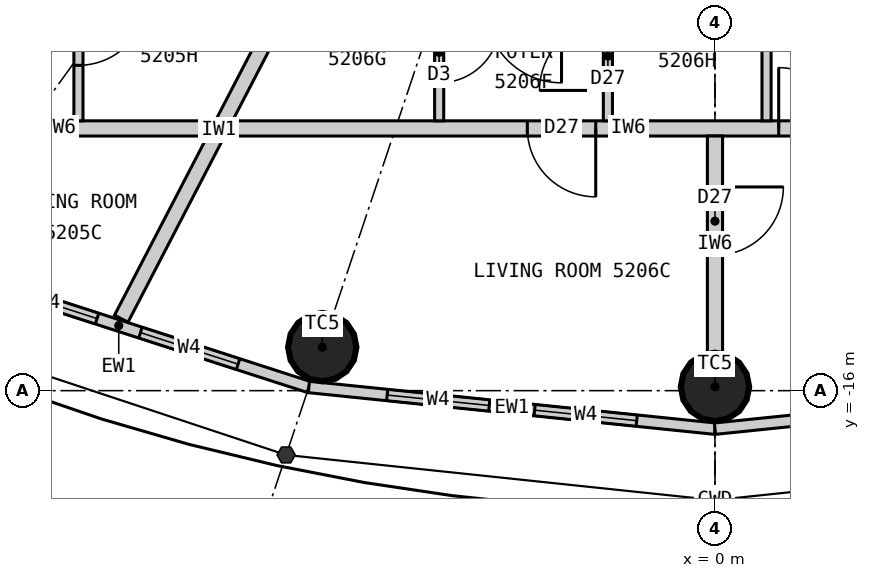
"""IFC4 building model, lengths in metres.
Left out: names, types, materials, properties, quantities, classifications, styles, units other than length and angle.
Written with IfcOpenShell. Run it as: python <this file> out.ifc"""

import sys

from ifc_helpers import new_model, si_unit, direction, frame, frame_2d, origin, origin_2d, place, context, subcontext, project, spatial, rectangle, circle, extrude, element, fill, save


model = new_model("IFC4")
c1 = context("Model", 3, precision=1e-05, world=origin(), true_north=direction((0.0, 1.0)))
c2 = subcontext(c1, "Body", "Model", "MODEL_VIEW")
j1 = project(units=[si_unit("LENGTHUNIT", "METRE"), si_unit("PLANEANGLEUNIT", "RADIAN")], contexts=[c1])
p1 = place(None, origin())
s1 = spatial("IfcSite", under=j1, at=p1, CompositionType="ELEMENT")
p2 = place(p1, origin())
s2 = spatial("IfcBuilding", under=s1, at=p2, CompositionType="ELEMENT")
p3 = place(p2, frame((0.0, 0.0, 196.2)))
s3 = spatial("IfcBuildingStorey", under=s2, at=p3, CompositionType="ELEMENT", Elevation=196.2)
for number, where, z_axis, x_axis in (
    (1, (-5.167, -15.427, 0.0), (0.0, 0.0, 1.0), (1.0, 0.0, 0.0)),
    (2, (0.0, -15.95, 0.0), (0.0, 0.0, 1.0), (1.0, 0.0, 0.0)),
):
    element("IfcColumn", number, at=place(p3, frame(where, z_axis=z_axis, x_axis=x_axis)), inside=s3, PredefinedType="COLUMN", context=c2, shape_type="SweptSolid", body=[
        extrude(circle(Radius=0.45, at=origin_2d()), origin(), (0.0, 0.0, 1.0), 3.3),
    ])
p4 = place(p3, frame((-10.346, -14.336, 0.0), z_axis=(0.0, 0.0, 1.0), x_axis=(0.951644702515, -0.307200846638, 0.0)))
e3 = element("IfcWall", 3, at=p4, inside=s3, PredefinedType="ELEMENTEDWALL", context=c2, shape_type="SweptSolid", body=[
    extrude(rectangle(XDim=5.258, YDim=0.15, at=frame_2d((2.629, 0.0))), origin(), (0.0, 0.0, 1.0), 3.12),
])
p5 = place(p4, frame((0.979, 0.0, 0.9)))
e4 = element("IfcOpeningElement", 4, at=p5, cuts=e3, PredefinedType="OPENING", context=c2, shape_type="SweptSolid", body=[
    extrude(rectangle(XDim=1.35, YDim=1.9, at=frame_2d((0.675, 0.95))), frame((0.0, 0.085, 0.0), z_axis=(0.0, -1.0, 0.0), x_axis=(1.0, 0.0, 0.0)), (0.0, 0.0, 1.0), 0.17),
])
p6 = place(p4, frame((2.929, 0.0, 0.9)))
e5 = element("IfcOpeningElement", 5, at=p6, cuts=e3, PredefinedType="OPENING", context=c2, shape_type="SweptSolid", body=[
    extrude(rectangle(XDim=1.35, YDim=1.9, at=frame_2d((0.675, 0.95))), frame((0.0, 0.085, 0.0), z_axis=(0.0, -1.0, 0.0), x_axis=(1.0, 0.0, 0.0)), (0.0, 0.0, 1.0), 0.17),
])
p7 = place(p3, frame((-5.343, -15.952, 0.0), z_axis=(0.0, 0.0, 1.0), x_axis=(0.994774574972, -0.102095763818, 0.0)))
e6 = element("IfcWall", 6, at=p7, inside=s3, PredefinedType="ELEMENTEDWALL", context=c2, shape_type="SweptSolid", body=[
    extrude(rectangle(XDim=5.371, YDim=0.15, at=frame_2d((2.686, 0.0))), origin(), (0.0, 0.0, 1.0), 3.12),
])
p8 = place(p7, frame((1.035, 0.0, 0.9)))
e7 = element("IfcOpeningElement", 7, at=p8, cuts=e6, PredefinedType="OPENING", context=c2, shape_type="SweptSolid", body=[
    extrude(rectangle(XDim=1.35, YDim=1.9, at=frame_2d((0.675, 0.95))), frame((0.0, 0.085, 0.0), z_axis=(0.0, -1.0, 0.0), x_axis=(1.0, 0.0, 0.0)), (0.0, 0.0, 1.0), 0.17),
])
p9 = place(p7, frame((2.985, 0.0, 0.9)))
e8 = element("IfcOpeningElement", 8, at=p9, cuts=e6, PredefinedType="OPENING", context=c2, shape_type="SweptSolid", body=[
    extrude(rectangle(XDim=1.35, YDim=1.9, at=frame_2d((0.675, 0.95))), frame((0.0, 0.085, 0.0), z_axis=(0.0, -1.0, 0.0), x_axis=(1.0, 0.0, 0.0)), (0.0, 0.0, 1.0), 0.17),
])
p10 = place(p3, frame((0.0, -16.5, 0.0), z_axis=(0.0, 0.0, 1.0), x_axis=(0.994774574972, 0.102095763818, 0.0)))
e9 = element("IfcWall", 9, at=p10, inside=s3, PredefinedType="ELEMENTEDWALL", context=c2, shape_type="SweptSolid", body=[
    extrude(rectangle(XDim=5.371, YDim=0.15, at=frame_2d((2.686, 0.0))), origin(), (0.0, 0.0, 1.0), 3.12),
])
p11 = place(p10, frame((1.035, 0.0, 0.9)))
e10 = element("IfcOpeningElement", 10, at=p11, cuts=e9, PredefinedType="OPENING", context=c2, shape_type="SweptSolid", body=[
    extrude(rectangle(XDim=1.35, YDim=1.9, at=frame_2d((0.675, 0.95))), frame((0.0, 0.085, 0.0), z_axis=(0.0, -1.0, 0.0), x_axis=(1.0, 0.0, 0.0)), (0.0, 0.0, 1.0), 0.17),
])
p12 = place(p10, frame((2.985, 0.0, 0.9)))
e11 = element("IfcOpeningElement", 11, at=p12, cuts=e9, PredefinedType="OPENING", context=c2, shape_type="SweptSolid", body=[
    extrude(rectangle(XDim=1.35, YDim=1.9, at=frame_2d((0.675, 0.95))), frame((0.0, 0.085, 0.0), z_axis=(0.0, -1.0, 0.0), x_axis=(1.0, 0.0, 0.0)), (0.0, 0.0, 1.0), 0.17),
])
p13 = place(p3, frame((-5.241, -10.1, 0.0), z_axis=(0.0, 0.0, 1.0), x_axis=(-0.460603196597, -0.887606160008, 0.0)))
e12 = element("IfcWall", 12, at=p13, inside=s3, PredefinedType="PARTITIONING", context=c2, shape_type="SweptSolid", body=[
    extrude(rectangle(XDim=5.58, YDim=0.2, at=frame_2d((2.79, 0.0))), origin(), (0.0, 0.0, 1.0), 3.12),
])
p14 = place(p3, frame((-10.609, -12.55, 0.0), z_axis=(0.0, 0.0, 1.0), x_axis=(1.0, 0.0, 0.0)))
e13 = element("IfcWall", 13, at=p14, inside=s3, PredefinedType="PARTITIONING", context=c2, shape_type="SweptSolid", body=[
    extrude(rectangle(XDim=3.947, YDim=0.2, at=frame_2d((1.974, 0.0))), origin(), (0.0, 0.0, 1.0), 3.12),
])
p15 = place(p3, frame((-8.375, -10.1, 0.0), z_axis=(0.0, 0.0, 1.0), x_axis=(0.0, -1.0, 0.0)))
e14 = element("IfcWall", 14, at=p15, inside=s3, PredefinedType="PARTITIONING", context=c2, shape_type="SweptSolid", body=[
    extrude(rectangle(XDim=2.35, YDim=0.12, at=frame_2d((1.175, 0.0))), origin(), (0.0, 0.0, 1.0), 3.12),
])
p16 = place(p15, frame((0.72, 0.0, 0.0)))
e15 = element("IfcOpeningElement", 15, at=p16, cuts=e14, PredefinedType="OPENING", context=c2, shape_type="SweptSolid", body=[
    extrude(rectangle(XDim=0.9, YDim=2.1, at=frame_2d((0.45, 1.05))), frame((0.0, 0.07, 0.0), z_axis=(0.0, -1.0, 0.0), x_axis=(1.0, 0.0, 0.0)), (0.0, 0.0, 1.0), 0.14),
])
p17 = place(p3, frame((-6.364, -12.55, 0.0), z_axis=(0.0, 0.0, 1.0), x_axis=(1.0, 0.0, 0.0)))
e16 = element("IfcWall", 16, at=p17, inside=s3, PredefinedType="PARTITIONING", context=c2, shape_type="SweptSolid", body=[
    extrude(rectangle(XDim=10.446, YDim=0.2, at=frame_2d((5.223, 0.0))), origin(), (0.0, 0.0, 1.0), 3.12),
])
p18 = place(p17, frame((7.202, 0.0, 0.0)))
e17 = element("IfcOpeningElement", 17, at=p18, cuts=e16, PredefinedType="OPENING", context=c2, shape_type="SweptSolid", body=[
    extrude(rectangle(XDim=0.8, YDim=2.1, at=frame_2d((0.4, 1.05))), frame((0.0, 0.11, 0.0), z_axis=(0.0, -1.0, 0.0), x_axis=(1.0, 0.0, 0.0)), (0.0, 0.0, 1.0), 0.22),
])
p19 = place(p17, frame((3.895, 0.0, 0.0)))
e18 = element("IfcOpeningElement", 18, at=p19, cuts=e16, PredefinedType="OPENING", context=c2, shape_type="SweptSolid", body=[
    extrude(rectangle(XDim=0.9, YDim=2.1, at=frame_2d((0.45, 1.05))), frame((0.0, 0.11, 0.0), z_axis=(0.0, -1.0, 0.0), x_axis=(1.0, 0.0, 0.0)), (0.0, 0.0, 1.0), 0.22),
])
p20 = place(p3, frame((0.0, -12.65, 0.0), z_axis=(0.0, 0.0, 1.0), x_axis=(0.0, -1.0, 0.0)))
e19 = element("IfcWall", 19, at=p20, inside=s3, PredefinedType="PARTITIONING", context=c2, shape_type="SweptSolid", body=[
    extrude(rectangle(XDim=2.85, YDim=0.2, at=frame_2d((1.425, 0.0))), origin(), (0.0, 0.0, 1.0), 2.42),
])
p21 = place(p20, frame((0.67, 0.0, 0.0)))
e20 = element("IfcOpeningElement", 20, at=p21, cuts=e19, PredefinedType="OPENING", context=c2, shape_type="SweptSolid", body=[
    extrude(rectangle(XDim=0.9, YDim=2.1, at=frame_2d((0.45, 1.05))), frame((0.0, 0.11, 0.0), z_axis=(0.0, -1.0, 0.0), x_axis=(1.0, 0.0, 0.0)), (0.0, 0.0, 1.0), 0.22),
])
p22 = place(p3, frame((-3.629, -10.1, 0.0), z_axis=(0.0, 0.0, 1.0), x_axis=(0.0, -1.0, 0.0)))
e21 = element("IfcWall", 21, at=p22, inside=s3, PredefinedType="PARTITIONING", context=c2, shape_type="SweptSolid", body=[
    extrude(rectangle(XDim=2.35, YDim=0.12, at=frame_2d((1.175, 0.0))), origin(), (0.0, 0.0, 1.0), 3.12),
])
p23 = place(p22, frame((1.05, 0.0, 0.0)))
e22 = element("IfcOpeningElement", 22, at=p23, cuts=e21, PredefinedType="OPENING", context=c2, shape_type="SweptSolid", body=[
    extrude(rectangle(XDim=0.8, YDim=2.1, at=frame_2d((0.4, 1.05))), frame((0.0, 0.07, 0.0), z_axis=(0.0, -1.0, 0.0), x_axis=(1.0, 0.0, 0.0)), (0.0, 0.0, 1.0), 0.14),
])
p24 = place(p3, frame((-1.409, -10.1, 0.0), z_axis=(0.0, 0.0, 1.0), x_axis=(0.0, -1.0, 0.0)))
e23 = element("IfcWall", 23, at=p24, inside=s3, PredefinedType="PARTITIONING", context=c2, shape_type="SweptSolid", body=[
    extrude(rectangle(XDim=2.35, YDim=0.12, at=frame_2d((1.175, 0.0))), origin(), (0.0, 0.0, 1.0), 3.12),
])
p25 = place(p24, frame((1.05, 0.0, 0.0)))
e24 = element("IfcOpeningElement", 24, at=p25, cuts=e23, PredefinedType="OPENING", context=c2, shape_type="SweptSolid", body=[
    extrude(rectangle(XDim=0.9, YDim=2.1, at=frame_2d((0.45, 1.05))), frame((0.0, 0.07, 0.0), z_axis=(0.0, -1.0, 0.0), x_axis=(1.0, 0.0, 0.0)), (0.0, 0.0, 1.0), 0.14),
])
p26 = place(p3, frame((0.678, -10.1, 0.0), z_axis=(0.0, 0.0, 1.0), x_axis=(0.0, -1.0, 0.0)))
e25 = element("IfcWall", 25, at=p26, inside=s3, PredefinedType="PARTITIONING", context=c2, shape_type="SweptSolid", body=[
    extrude(rectangle(XDim=2.35, YDim=0.12, at=frame_2d((1.175, 0.0))), origin(), (0.0, 0.0, 1.0), 3.12),
])
p27 = place(p5, origin())
e26 = element("IfcWindow", 26, at=p27, inside=s3, PartitioningType="SINGLE_PANEL", PredefinedType="WINDOW", context=c2, shape_type="SweptSolid", body=[
    extrude(rectangle(XDim=1.35, YDim=1.9, at=frame_2d((0.675, 0.95))), frame((0.0, 0.03, 0.0), z_axis=(0.0, -1.0, 0.0), x_axis=(1.0, 0.0, 0.0)), (0.0, 0.0, 1.0), 0.06),
])
fill(e4, e26)
p28 = place(p6, origin())
e27 = element("IfcWindow", 27, at=p28, inside=s3, PartitioningType="SINGLE_PANEL", PredefinedType="WINDOW", context=c2, shape_type="SweptSolid", body=[
    extrude(rectangle(XDim=1.35, YDim=1.9, at=frame_2d((0.675, 0.95))), frame((0.0, 0.03, 0.0), z_axis=(0.0, -1.0, 0.0), x_axis=(1.0, 0.0, 0.0)), (0.0, 0.0, 1.0), 0.06),
])
fill(e5, e27)
p29 = place(p8, origin())
e28 = element("IfcWindow", 28, at=p29, inside=s3, PartitioningType="SINGLE_PANEL", PredefinedType="WINDOW", context=c2, shape_type="SweptSolid", body=[
    extrude(rectangle(XDim=1.35, YDim=1.9, at=frame_2d((0.675, 0.95))), frame((0.0, 0.03, 0.0), z_axis=(0.0, -1.0, 0.0), x_axis=(1.0, 0.0, 0.0)), (0.0, 0.0, 1.0), 0.06),
])
fill(e7, e28)
p30 = place(p9, origin())
e29 = element("IfcWindow", 29, at=p30, inside=s3, PartitioningType="SINGLE_PANEL", PredefinedType="WINDOW", context=c2, shape_type="SweptSolid", body=[
    extrude(rectangle(XDim=1.35, YDim=1.9, at=frame_2d((0.675, 0.95))), frame((0.0, 0.03, 0.0), z_axis=(0.0, -1.0, 0.0), x_axis=(1.0, 0.0, 0.0)), (0.0, 0.0, 1.0), 0.06),
])
fill(e8, e29)
p31 = place(p16, origin())
e30 = element("IfcDoor", 30, at=p31, inside=s3, OperationType="SINGLE_SWING_LEFT", PredefinedType="DOOR", context=c2, shape_type="SweptSolid", body=[
    extrude(rectangle(XDim=0.9, YDim=2.1, at=frame_2d((0.45, 1.05))), frame((0.0, 0.025, 0.0), z_axis=(0.0, -1.0, 0.0), x_axis=(1.0, 0.0, 0.0)), (0.0, 0.0, 1.0), 0.05),
])
fill(e15, e30)
p32 = place(p23, origin())
e31 = element("IfcDoor", 31, at=p32, inside=s3, OperationType="SINGLE_SWING_LEFT", PredefinedType="DOOR", context=c2, shape_type="SweptSolid", body=[
    extrude(rectangle(XDim=0.8, YDim=2.1, at=frame_2d((0.4, 1.05))), frame((0.0, 0.025, 0.0), z_axis=(0.0, -1.0, 0.0), x_axis=(1.0, 0.0, 0.0)), (0.0, 0.0, 1.0), 0.05),
])
fill(e22, e31)
p33 = place(p25, origin())
e32 = element("IfcDoor", 32, at=p33, inside=s3, OperationType="SINGLE_SWING_RIGHT", PredefinedType="DOOR", context=c2, shape_type="SweptSolid", body=[
    extrude(rectangle(XDim=0.9, YDim=2.1, at=frame_2d((0.45, 1.05))), frame((0.0, 0.025, 0.0), z_axis=(0.0, -1.0, 0.0), x_axis=(1.0, 0.0, 0.0)), (0.0, 0.0, 1.0), 0.05),
])
fill(e24, e32)
p34 = place(p18, origin())
e33 = element("IfcDoor", 33, at=p34, inside=s3, OperationType="SINGLE_SWING_LEFT", PredefinedType="DOOR", context=c2, shape_type="SweptSolid", body=[
    extrude(rectangle(XDim=0.8, YDim=2.1, at=frame_2d((0.4, 1.05))), frame((0.0, 0.025, 0.0), z_axis=(0.0, -1.0, 0.0), x_axis=(1.0, 0.0, 0.0)), (0.0, 0.0, 1.0), 0.05),
])
fill(e17, e33)
p35 = place(p19, origin())
e34 = element("IfcDoor", 34, at=p35, inside=s3, OperationType="SINGLE_SWING_RIGHT", PredefinedType="DOOR", context=c2, shape_type="SweptSolid", body=[
    extrude(rectangle(XDim=0.9, YDim=2.1, at=frame_2d((0.45, 1.05))), frame((0.0, 0.025, 0.0), z_axis=(0.0, -1.0, 0.0), x_axis=(1.0, 0.0, 0.0)), (0.0, 0.0, 1.0), 0.05),
])
fill(e18, e34)
p36 = place(p21, origin())
e35 = element("IfcDoor", 35, at=p36, inside=s3, OperationType="SINGLE_SWING_LEFT", PredefinedType="DOOR", context=c2, shape_type="SweptSolid", body=[
    extrude(rectangle(XDim=0.9, YDim=2.1, at=frame_2d((0.45, 1.05))), frame((0.0, 0.025, 0.0), z_axis=(0.0, -1.0, 0.0), x_axis=(1.0, 0.0, 0.0)), (0.0, 0.0, 1.0), 0.05),
])
fill(e20, e35)
save(model, sys.argv[1])
